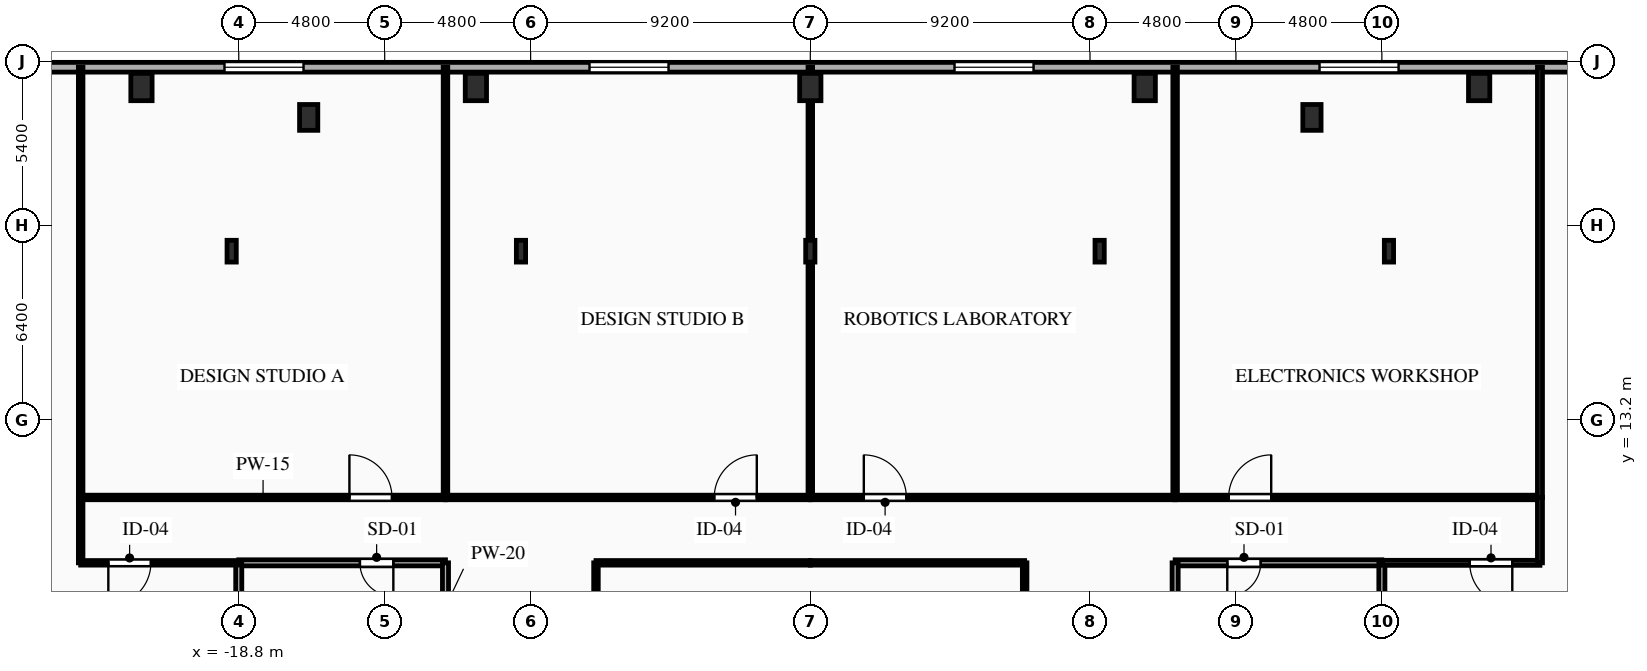
"""IFC4 building model, lengths in metres.
Left out: names, types, materials, properties, quantities, classifications, styles, units other than length and angle.
Written with IfcOpenShell. Run it as: python <this file> out.ifc"""

import sys

from ifc_helpers import new_model, si_unit, direction, frame, frame_2d, origin, origin_2d, place, context, subcontext, project, spatial, rectangle, i_section, extrude, element, fill, save


model = new_model("IFC4")
c1 = context("Model", 3, precision=1e-05, world=origin(), true_north=direction((0.0, 1.0)))
c2 = subcontext(c1, "Body", "Model", "MODEL_VIEW")
j1 = project(units=[si_unit("LENGTHUNIT", "METRE"), si_unit("PLANEANGLEUNIT", "RADIAN")], contexts=[c1])
p1 = place(None, origin())
s1 = spatial("IfcSite", under=j1, at=p1, CompositionType="ELEMENT")
p2 = place(p1, origin())
s2 = spatial("IfcBuilding", under=s1, at=p2, CompositionType="ELEMENT")
p3 = place(p2, frame((0.0, 0.0, 9.0)))
s3 = spatial("IfcBuildingStorey", under=s2, at=p3, CompositionType="ELEMENT", Elevation=9.0)
for number, where, z_axis, x_axis in (
    (1, (-22.0, 24.15, 0.0), (0.0, 0.0, 1.0), (1.0, 0.0, 0.0)),
    (2, (-11.0, 24.15, 0.0), (0.0, 0.0, 1.0), (1.0, 0.0, 0.0)),
    (3, (0.0, 24.15, 0.0), (0.0, 0.0, 1.0), (1.0, 0.0, 0.0)),
    (4, (11.0, 24.15, 0.0), (0.0, 0.0, 1.0), (1.0, 0.0, 0.0)),
    (5, (22.0, 24.15, 0.0), (0.0, 0.0, 1.0), (1.0, 0.0, 0.0)),
):
    element("IfcColumn", number, at=place(p3, frame(where, z_axis=z_axis, x_axis=x_axis)), inside=s3, PredefinedType="COLUMN", context=c2, shape_type="SweptSolid", body=[
        extrude(rectangle(XDim=0.7, YDim=0.9, at=origin_2d()), origin(), (0.0, 0.0, 1.0), 4.5),
    ])
for number, where, z_axis, x_axis in (
    (6, (-16.5, 23.15, 0.0), (0.0, 0.0, 1.0), (1.0, 0.0, 0.0)),
    (7, (16.5, 23.15, 0.0), (0.0, 0.0, 1.0), (1.0, 0.0, 0.0)),
):
    element("IfcColumn", number, at=place(p3, frame(where, z_axis=z_axis, x_axis=x_axis)), inside=s3, PredefinedType="PILASTER", context=c2, shape_type="SweptSolid", body=[
        extrude(rectangle(XDim=0.6, YDim=0.85, at=origin_2d()), origin(), (0.0, 0.0, 1.0), 4.5),
    ])
for number, where, z_axis, x_axis in (
    (8, (19.033, 18.75, 0.0), (0.0, 0.0, 1.0), (1.0, 0.0, 0.0)),
    (9, (9.517, 18.75, 0.0), (0.0, 0.0, 1.0), (1.0, 0.0, 0.0)),
    (10, (0.0, 18.75, 0.0), (0.0, 0.0, 1.0), (1.0, 0.0, 0.0)),
    (11, (-9.517, 18.75, 0.0), (0.0, 0.0, 1.0), (1.0, 0.0, 0.0)),
    (12, (-19.033, 18.75, 0.0), (0.0, 0.0, 1.0), (1.0, 0.0, 0.0)),
):
    element("IfcColumn", number, at=place(p3, frame(where, z_axis=z_axis, x_axis=x_axis)), inside=s3, PredefinedType="COLUMN", context=c2, shape_type="SweptSolid", body=[
        extrude(i_section(OverallWidth=0.304, OverallDepth=0.716, WebThickness=0.021, FlangeThickness=0.04, FilletRadius=0.027, at=origin_2d()), origin(), (0.0, 0.0, 1.0), 4.5),
    ])
p4 = place(p3, frame((-38.3, 24.8, 0.0), z_axis=(0.0, 0.0, 1.0), x_axis=(1.0, 0.0, 0.0)))
e13 = element("IfcWall", 13, at=p4, inside=s3, PredefinedType="SOLIDWALL", context=c2, shape_type="SweptSolid", body=[
    extrude(rectangle(XDim=76.6, YDim=0.32, at=frame_2d((38.3, 0.0))), origin(), (0.0, 0.0, 1.0), 4.17),
])
p5 = place(p4, frame((6.104, 0.0, 0.85)))
e14 = element("IfcOpeningElement", 14, at=p5, cuts=e13, PredefinedType="OPENING", context=c2, shape_type="SweptSolid", body=[
    extrude(rectangle(XDim=2.6, YDim=2.4, at=frame_2d((1.3, 1.2))), frame((0.0, 0.17, 0.0), z_axis=(0.0, -1.0, 0.0), x_axis=(1.0, 0.0, 0.0)), (0.0, 0.0, 1.0), 0.34),
])
p6 = place(p4, frame((19.031, 0.0, 0.85)))
e15 = element("IfcOpeningElement", 15, at=p6, cuts=e13, PredefinedType="OPENING", context=c2, shape_type="SweptSolid", body=[
    extrude(rectangle(XDim=2.6, YDim=2.4, at=frame_2d((1.3, 1.2))), frame((0.0, 0.17, 0.0), z_axis=(0.0, -1.0, 0.0), x_axis=(1.0, 0.0, 0.0)), (0.0, 0.0, 1.0), 0.34),
])
p7 = place(p4, frame((31.037, 0.0, 0.85)))
e16 = element("IfcOpeningElement", 16, at=p7, cuts=e13, PredefinedType="OPENING", context=c2, shape_type="SweptSolid", body=[
    extrude(rectangle(XDim=2.6, YDim=2.4, at=frame_2d((1.3, 1.2))), frame((0.0, 0.17, 0.0), z_axis=(0.0, -1.0, 0.0), x_axis=(1.0, 0.0, 0.0)), (0.0, 0.0, 1.0), 0.34),
])
p8 = place(p4, frame((43.043, 0.0, 0.85)))
e17 = element("IfcOpeningElement", 17, at=p8, cuts=e13, PredefinedType="OPENING", context=c2, shape_type="SweptSolid", body=[
    extrude(rectangle(XDim=2.6, YDim=2.4, at=frame_2d((1.3, 1.2))), frame((0.0, 0.17, 0.0), z_axis=(0.0, -1.0, 0.0), x_axis=(1.0, 0.0, 0.0)), (0.0, 0.0, 1.0), 0.34),
])
p9 = place(p4, frame((55.049, 0.0, 0.85)))
e18 = element("IfcOpeningElement", 18, at=p9, cuts=e13, PredefinedType="OPENING", context=c2, shape_type="SweptSolid", body=[
    extrude(rectangle(XDim=2.6, YDim=2.4, at=frame_2d((1.3, 1.2))), frame((0.0, 0.17, 0.0), z_axis=(0.0, -1.0, 0.0), x_axis=(1.0, 0.0, 0.0)), (0.0, 0.0, 1.0), 0.34),
])
p10 = place(p4, frame((67.976, 0.0, 0.85)))
e19 = element("IfcOpeningElement", 19, at=p10, cuts=e13, PredefinedType="OPENING", context=c2, shape_type="SweptSolid", body=[
    extrude(rectangle(XDim=2.6, YDim=2.4, at=frame_2d((1.3, 1.2))), frame((0.0, 0.17, 0.0), z_axis=(0.0, -1.0, 0.0), x_axis=(1.0, 0.0, 0.0)), (0.0, 0.0, 1.0), 0.34),
])
p11 = place(p3, frame((-12.0, 8.5, 0.0), z_axis=(0.0, 0.0, 1.0), x_axis=(-1.0, 0.0, 0.0)))
e20 = element("IfcWall", 20, at=p11, inside=s3, PredefinedType="PARTITIONING", context=c2, shape_type="SweptSolid", body=[
    extrude(rectangle(XDim=6.8, YDim=0.2, at=frame_2d((3.4, 0.0))), origin(), (0.0, 0.0, 1.0), 4.17),
])
p12 = place(p11, frame((1.715, 0.0, 0.0)))
e21 = element("IfcOpeningElement", 21, at=p12, cuts=e20, PredefinedType="OPENING", context=c2, shape_type="SweptSolid", body=[
    extrude(rectangle(XDim=1.1, YDim=2.15, at=frame_2d((0.55, 1.075))), frame((0.0, 0.11, 0.0), z_axis=(0.0, -1.0, 0.0), x_axis=(1.0, 0.0, 0.0)), (0.0, 0.0, 1.0), 0.22),
])
p13 = place(p3, frame((-12.0, 5.6, 0.0), z_axis=(0.0, 0.0, 1.0), x_axis=(0.0, 1.0, 0.0)))
e22 = element("IfcWall", 22, at=p13, inside=s3, PredefinedType="PARTITIONING", context=c2, shape_type="SweptSolid", body=[
    extrude(rectangle(XDim=2.9, YDim=0.2, at=frame_2d((1.45, 0.0))), origin(), (0.0, 0.0, 1.0), 4.17),
])
p14 = place(p3, frame((-18.8, 8.5, 0.0), z_axis=(0.0, 0.0, 1.0), x_axis=(0.0, -1.0, 0.0)))
e23 = element("IfcWall", 23, at=p14, inside=s3, PredefinedType="PARTITIONING", context=c2, shape_type="SweptSolid", body=[
    extrude(rectangle(XDim=2.9, YDim=0.2, at=frame_2d((1.45, 0.0))), origin(), (0.0, 0.0, 1.0), 3.655),
])
p15 = place(p3, frame((18.8, 8.5, 0.0), z_axis=(0.0, 0.0, 1.0), x_axis=(-1.0, 0.0, 0.0)))
e24 = element("IfcWall", 24, at=p15, inside=s3, PredefinedType="PARTITIONING", context=c2, shape_type="SweptSolid", body=[
    extrude(rectangle(XDim=6.8, YDim=0.2, at=frame_2d((3.4, 0.0))), origin(), (0.0, 0.0, 1.0), 4.17),
])
p16 = place(p15, frame((3.985, 0.0, 0.0)))
e25 = element("IfcOpeningElement", 25, at=p16, cuts=e24, PredefinedType="OPENING", context=c2, shape_type="SweptSolid", body=[
    extrude(rectangle(XDim=1.1, YDim=2.15, at=frame_2d((0.55, 1.075))), frame((0.0, 0.11, 0.0), z_axis=(0.0, -1.0, 0.0), x_axis=(1.0, 0.0, 0.0)), (0.0, 0.0, 1.0), 0.22),
])
p17 = place(p3, frame((12.0, 8.5, 0.0), z_axis=(0.0, 0.0, 1.0), x_axis=(0.0, -1.0, 0.0)))
e26 = element("IfcWall", 26, at=p17, inside=s3, PredefinedType="PARTITIONING", context=c2, shape_type="SweptSolid", body=[
    extrude(rectangle(XDim=2.9, YDim=0.2, at=frame_2d((1.45, 0.0))), origin(), (0.0, 0.0, 1.0), 4.17),
])
p18 = place(p3, frame((18.8, 5.6, 0.0), z_axis=(0.0, 0.0, 1.0), x_axis=(0.0, 1.0, 0.0)))
e27 = element("IfcWall", 27, at=p18, inside=s3, PredefinedType="PARTITIONING", context=c2, shape_type="SweptSolid", body=[
    extrude(rectangle(XDim=2.9, YDim=0.2, at=frame_2d((1.45, 0.0))), origin(), (0.0, 0.0, 1.0), 3.655),
])
p19 = place(p3, frame((-18.8, 8.5, 0.0), z_axis=(0.0, 0.0, 1.0), x_axis=(-1.0, 0.0, 0.0)))
e28 = element("IfcWall", 28, at=p19, inside=s3, PredefinedType="PARTITIONING", context=c2, shape_type="SweptSolid", body=[
    extrude(rectangle(XDim=5.2, YDim=0.15, at=frame_2d((2.6, 0.0))), origin(), (0.0, 0.0, 1.0), 4.17),
])
p20 = place(p19, frame((2.89, 0.0, 0.0)))
e29 = element("IfcOpeningElement", 29, at=p20, cuts=e28, PredefinedType="OPENING", context=c2, shape_type="SweptSolid", body=[
    extrude(rectangle(XDim=1.4, YDim=2.3, at=frame_2d((0.7, 1.15))), frame((0.0, 0.085, 0.0), z_axis=(0.0, -1.0, 0.0), x_axis=(1.0, 0.0, 0.0)), (0.0, 0.0, 1.0), 0.17),
])
p21 = place(p3, frame((-24.0, 8.5, 0.0), z_axis=(0.0, 0.0, 1.0), x_axis=(0.0, 1.0, 0.0)))
e30 = element("IfcWall", 30, at=p21, inside=s3, PredefinedType="PARTITIONING", context=c2, shape_type="SweptSolid", body=[
    extrude(rectangle(XDim=2.15, YDim=0.15, at=frame_2d((1.075, 0.0))), origin(), (0.0, 0.0, 1.0), 4.17),
])
p22 = place(p3, frame((-24.0, 10.65, 0.0), z_axis=(0.0, 0.0, 1.0), x_axis=(1.0, 0.0, 0.0)))
e31 = element("IfcWall", 31, at=p22, inside=s3, PredefinedType="PARTITIONING", context=c2, shape_type="SweptSolid", body=[
    extrude(rectangle(XDim=12.0, YDim=0.15, at=frame_2d((6.0, 0.0))), origin(), (0.0, 0.0, 1.0), 4.17),
])
p23 = place(p22, frame((8.84, 0.0, 0.0)))
e32 = element("IfcOpeningElement", 32, at=p23, cuts=e31, PredefinedType="OPENING", context=c2, shape_type="SweptSolid", body=[
    extrude(rectangle(XDim=1.4, YDim=2.3, at=frame_2d((0.7, 1.15))), frame((0.0, 0.085, 0.0), z_axis=(0.0, -1.0, 0.0), x_axis=(1.0, 0.0, 0.0)), (0.0, 0.0, 1.0), 0.17),
])
p24 = place(p3, frame((-12.0, 10.65, 0.0), z_axis=(0.0, 0.0, 1.0), x_axis=(1.0, 0.0, 0.0)))
e33 = element("IfcWall", 33, at=p24, inside=s3, PredefinedType="PARTITIONING", context=c2, shape_type="SweptSolid", body=[
    extrude(rectangle(XDim=12.0, YDim=0.15, at=frame_2d((6.0, 0.0))), origin(), (0.0, 0.0, 1.0), 4.17),
])
p25 = place(p24, frame((8.84, 0.0, 0.0)))
e34 = element("IfcOpeningElement", 34, at=p25, cuts=e33, PredefinedType="OPENING", context=c2, shape_type="SweptSolid", body=[
    extrude(rectangle(XDim=1.4, YDim=2.3, at=frame_2d((0.7, 1.15))), frame((0.0, 0.085, 0.0), z_axis=(0.0, -1.0, 0.0), x_axis=(1.0, 0.0, 0.0)), (0.0, 0.0, 1.0), 0.17),
])
p26 = place(p3, frame((0.0, 8.5, 0.0), z_axis=(0.0, 0.0, 1.0), x_axis=(-1.0, 0.0, 0.0)))
e35 = element("IfcWall", 35, at=p26, inside=s3, PredefinedType="PARTITIONING", context=c2, shape_type="SweptSolid", body=[
    extrude(rectangle(XDim=7.05, YDim=0.15, at=frame_2d((3.525, 0.0))), origin(), (0.0, 0.0, 1.0), 4.17),
])
p27 = place(p3, frame((0.0, 10.65, 0.0), z_axis=(0.0, 0.0, 1.0), x_axis=(1.0, 0.0, 0.0)))
e36 = element("IfcWall", 36, at=p27, inside=s3, PredefinedType="PARTITIONING", context=c2, shape_type="SweptSolid", body=[
    extrude(rectangle(XDim=12.0, YDim=0.15, at=frame_2d((6.0, 0.0))), origin(), (0.0, 0.0, 1.0), 4.17),
])
p28 = place(p27, frame((1.76, 0.0, 0.0)))
e37 = element("IfcOpeningElement", 37, at=p28, cuts=e36, PredefinedType="OPENING", context=c2, shape_type="SweptSolid", body=[
    extrude(rectangle(XDim=1.4, YDim=2.3, at=frame_2d((0.7, 1.15))), frame((0.0, 0.085, 0.0), z_axis=(0.0, -1.0, 0.0), x_axis=(1.0, 0.0, 0.0)), (0.0, 0.0, 1.0), 0.17),
])
p29 = place(p3, frame((12.0, 10.65, 0.0), z_axis=(0.0, 0.0, 1.0), x_axis=(1.0, 0.0, 0.0)))
e38 = element("IfcWall", 38, at=p29, inside=s3, PredefinedType="PARTITIONING", context=c2, shape_type="SweptSolid", body=[
    extrude(rectangle(XDim=12.0, YDim=0.15, at=frame_2d((6.0, 0.0))), origin(), (0.0, 0.0, 1.0), 4.17),
])
p30 = place(p29, frame((1.76, 0.0, 0.0)))
e39 = element("IfcOpeningElement", 39, at=p30, cuts=e38, PredefinedType="OPENING", context=c2, shape_type="SweptSolid", body=[
    extrude(rectangle(XDim=1.4, YDim=2.3, at=frame_2d((0.7, 1.15))), frame((0.0, 0.085, 0.0), z_axis=(0.0, -1.0, 0.0), x_axis=(1.0, 0.0, 0.0)), (0.0, 0.0, 1.0), 0.17),
])
p31 = place(p3, frame((7.05, 8.5, 0.0), z_axis=(0.0, 0.0, 1.0), x_axis=(-1.0, 0.0, 0.0)))
e40 = element("IfcWall", 40, at=p31, inside=s3, PredefinedType="PARTITIONING", context=c2, shape_type="SweptSolid", body=[
    extrude(rectangle(XDim=7.05, YDim=0.15, at=frame_2d((3.525, 0.0))), origin(), (0.0, 0.0, 1.0), 4.17),
])
p32 = place(p3, frame((24.0, 8.5, 0.0), z_axis=(0.0, 0.0, 1.0), x_axis=(-1.0, 0.0, 0.0)))
e41 = element("IfcWall", 41, at=p32, inside=s3, PredefinedType="PARTITIONING", context=c2, shape_type="SweptSolid", body=[
    extrude(rectangle(XDim=5.2, YDim=0.165, at=frame_2d((2.6, 0.0))), origin(), (0.0, 0.0, 1.0), 4.17),
])
p33 = place(p32, frame((0.91, 0.0, 0.0)))
e42 = element("IfcOpeningElement", 42, at=p33, cuts=e41, PredefinedType="OPENING", context=c2, shape_type="SweptSolid", body=[
    extrude(rectangle(XDim=1.4, YDim=2.3, at=frame_2d((0.7, 1.15))), frame((0.0, 0.093, 0.0), z_axis=(0.0, -1.0, 0.0), x_axis=(1.0, 0.0, 0.0)), (0.0, 0.0, 1.0), 0.185),
])
p34 = place(p3, frame((24.0, 10.65, 0.0), z_axis=(0.0, 0.0, 1.0), x_axis=(0.0, -1.0, 0.0)))
e43 = element("IfcWall", 43, at=p34, inside=s3, PredefinedType="PARTITIONING", context=c2, shape_type="SweptSolid", body=[
    extrude(rectangle(XDim=2.15, YDim=0.165, at=frame_2d((1.075, 0.0))), origin(), (0.0, 0.0, 1.0), 4.17),
])
p35 = place(p3, frame((-7.05, 8.5, 0.0), z_axis=(0.0, 0.0, 1.0), x_axis=(0.0, -1.0, 0.0)))
e44 = element("IfcWall", 44, at=p35, inside=s3, PredefinedType="PARTITIONING", context=c2, shape_type="SweptSolid", body=[
    extrude(rectangle(XDim=14.1, YDim=0.15, at=frame_2d((7.05, 0.0))), origin(), (0.0, 0.0, 1.0), 4.17),
])
p36 = place(p35, frame((8.074, 0.0, 0.0)))
e45 = element("IfcOpeningElement", 45, at=p36, cuts=e44, PredefinedType="OPENING", context=c2, shape_type="SweptSolid", body=[
    extrude(rectangle(XDim=0.95, YDim=2.1, at=frame_2d((0.475, 1.05))), frame((0.0, 0.085, 0.0), z_axis=(0.0, -1.0, 0.0), x_axis=(1.0, 0.0, 0.0)), (0.0, 0.0, 1.0), 0.17),
])
p37 = place(p3, frame((7.05, -5.6, 0.0), z_axis=(0.0, 0.0, 1.0), x_axis=(0.0, 1.0, 0.0)))
e46 = element("IfcWall", 46, at=p37, inside=s3, PredefinedType="PARTITIONING", context=c2, shape_type="SweptSolid", body=[
    extrude(rectangle(XDim=14.1, YDim=0.15, at=frame_2d((7.05, 0.0))), origin(), (0.0, 0.0, 1.0), 4.17),
])
for number, where, z_axis, x_axis in (
    (47, (-24.0, 24.8, 0.0), (0.0, 0.0, 1.0), (0.0, -1.0, 0.0)),
    (48, (-12.0, 24.8, 0.0), (0.0, 0.0, 1.0), (0.0, -1.0, 0.0)),
):
    element("IfcWall", number, at=place(p3, frame(where, z_axis=z_axis, x_axis=x_axis)), inside=s3, PredefinedType="PARTITIONING", context=c2, shape_type="SweptSolid", body=[
        extrude(rectangle(XDim=14.15, YDim=0.15, at=frame_2d((7.075, 0.0))), origin(), (0.0, 0.0, 1.0), 4.17),
    ])
p38 = place(p3, frame((0.0, 24.8, 0.0), z_axis=(0.0, 0.0, 1.0), x_axis=(0.0, -1.0, 0.0)))
e49 = element("IfcWall", 49, at=p38, inside=s3, PredefinedType="PARTITIONING", context=c2, shape_type="SweptSolid", body=[
    extrude(rectangle(XDim=14.15, YDim=0.15, at=frame_2d((7.075, 0.0))), origin(), (0.0, 0.0, 1.0), 3.555),
])
p39 = place(p3, frame((12.0, 24.8, 0.0), z_axis=(0.0, 0.0, 1.0), x_axis=(0.0, -1.0, 0.0)))
e50 = element("IfcWall", 50, at=p39, inside=s3, PredefinedType="PARTITIONING", context=c2, shape_type="SweptSolid", body=[
    extrude(rectangle(XDim=14.15, YDim=0.15, at=frame_2d((7.075, 0.0))), origin(), (0.0, 0.0, 1.0), 4.17),
])
p40 = place(p3, frame((24.0, 24.8, 0.0), z_axis=(0.0, 0.0, 1.0), x_axis=(0.0, -1.0, 0.0)))
e51 = element("IfcWall", 51, at=p40, inside=s3, PredefinedType="PARTITIONING", context=c2, shape_type="SweptSolid", body=[
    extrude(rectangle(XDim=14.15, YDim=0.165, at=frame_2d((7.075, 0.0))), origin(), (0.0, 0.0, 1.0), 4.17),
])
p41 = place(p6, origin())
e52 = element("IfcWindow", 52, at=p41, inside=s3, PartitioningType="SINGLE_PANEL", PredefinedType="WINDOW", context=c2, shape_type="SweptSolid", body=[
    extrude(rectangle(XDim=2.6, YDim=2.4, at=frame_2d((1.3, 1.2))), frame((0.0, 0.03, 0.0), z_axis=(0.0, -1.0, 0.0), x_axis=(1.0, 0.0, 0.0)), (0.0, 0.0, 1.0), 0.06),
])
fill(e15, e52)
p42 = place(p7, origin())
e53 = element("IfcWindow", 53, at=p42, inside=s3, PartitioningType="SINGLE_PANEL", PredefinedType="WINDOW", context=c2, shape_type="SweptSolid", body=[
    extrude(rectangle(XDim=2.6, YDim=2.4, at=frame_2d((1.3, 1.2))), frame((0.0, 0.03, 0.0), z_axis=(0.0, -1.0, 0.0), x_axis=(1.0, 0.0, 0.0)), (0.0, 0.0, 1.0), 0.06),
])
fill(e16, e53)
p43 = place(p8, origin())
e54 = element("IfcWindow", 54, at=p43, inside=s3, PartitioningType="SINGLE_PANEL", PredefinedType="WINDOW", context=c2, shape_type="SweptSolid", body=[
    extrude(rectangle(XDim=2.6, YDim=2.4, at=frame_2d((1.3, 1.2))), frame((0.0, 0.03, 0.0), z_axis=(0.0, -1.0, 0.0), x_axis=(1.0, 0.0, 0.0)), (0.0, 0.0, 1.0), 0.06),
])
fill(e17, e54)
p44 = place(p9, origin())
e55 = element("IfcWindow", 55, at=p44, inside=s3, PartitioningType="SINGLE_PANEL", PredefinedType="WINDOW", context=c2, shape_type="SweptSolid", body=[
    extrude(rectangle(XDim=2.6, YDim=2.4, at=frame_2d((1.3, 1.2))), frame((0.0, 0.03, 0.0), z_axis=(0.0, -1.0, 0.0), x_axis=(1.0, 0.0, 0.0)), (0.0, 0.0, 1.0), 0.06),
])
fill(e18, e55)
p45 = place(p12, origin())
e56 = element("IfcDoor", 56, at=p45, inside=s3, OperationType="SINGLE_SWING_LEFT", PredefinedType="DOOR", context=c2, shape_type="SweptSolid", body=[
    extrude(rectangle(XDim=1.1, YDim=2.15, at=frame_2d((0.55, 1.075))), frame((0.0, 0.025, 0.0), z_axis=(0.0, -1.0, 0.0), x_axis=(1.0, 0.0, 0.0)), (0.0, 0.0, 1.0), 0.05),
])
fill(e21, e56)
p46 = place(p16, origin())
e57 = element("IfcDoor", 57, at=p46, inside=s3, OperationType="SINGLE_SWING_RIGHT", PredefinedType="DOOR", context=c2, shape_type="SweptSolid", body=[
    extrude(rectangle(XDim=1.1, YDim=2.15, at=frame_2d((0.55, 1.075))), frame((0.0, 0.025, 0.0), z_axis=(0.0, -1.0, 0.0), x_axis=(1.0, 0.0, 0.0)), (0.0, 0.0, 1.0), 0.05),
])
fill(e25, e57)
p47 = place(p20, origin())
e58 = element("IfcDoor", 58, at=p47, inside=s3, OperationType="SINGLE_SWING_RIGHT", PredefinedType="DOOR", context=c2, shape_type="SweptSolid", body=[
    extrude(rectangle(XDim=1.4, YDim=2.3, at=frame_2d((0.7, 1.15))), frame((0.0, 0.025, 0.0), z_axis=(0.0, -1.0, 0.0), x_axis=(1.0, 0.0, 0.0)), (0.0, 0.0, 1.0), 0.05),
])
fill(e29, e58)
p48 = place(p23, origin())
e59 = element("IfcDoor", 59, at=p48, inside=s3, OperationType="SINGLE_SWING_LEFT", PredefinedType="DOOR", context=c2, shape_type="SweptSolid", body=[
    extrude(rectangle(XDim=1.4, YDim=2.3, at=frame_2d((0.7, 1.15))), frame((0.0, 0.025, 0.0), z_axis=(0.0, -1.0, 0.0), x_axis=(1.0, 0.0, 0.0)), (0.0, 0.0, 1.0), 0.05),
])
fill(e32, e59)
p49 = place(p25, origin())
e60 = element("IfcDoor", 60, at=p49, inside=s3, OperationType="SINGLE_SWING_RIGHT", PredefinedType="DOOR", context=c2, shape_type="SweptSolid", body=[
    extrude(rectangle(XDim=1.4, YDim=2.3, at=frame_2d((0.7, 1.15))), frame((0.0, 0.025, 0.0), z_axis=(0.0, -1.0, 0.0), x_axis=(1.0, 0.0, 0.0)), (0.0, 0.0, 1.0), 0.05),
])
fill(e34, e60)
p50 = place(p28, origin())
e61 = element("IfcDoor", 61, at=p50, inside=s3, OperationType="SINGLE_SWING_LEFT", PredefinedType="DOOR", context=c2, shape_type="SweptSolid", body=[
    extrude(rectangle(XDim=1.4, YDim=2.3, at=frame_2d((0.7, 1.15))), frame((0.0, 0.025, 0.0), z_axis=(0.0, -1.0, 0.0), x_axis=(1.0, 0.0, 0.0)), (0.0, 0.0, 1.0), 0.05),
])
fill(e37, e61)
p51 = place(p30, origin())
e62 = element("IfcDoor", 62, at=p51, inside=s3, OperationType="SINGLE_SWING_RIGHT", PredefinedType="DOOR", context=c2, shape_type="SweptSolid", body=[
    extrude(rectangle(XDim=1.4, YDim=2.3, at=frame_2d((0.7, 1.15))), frame((0.0, 0.025, 0.0), z_axis=(0.0, -1.0, 0.0), x_axis=(1.0, 0.0, 0.0)), (0.0, 0.0, 1.0), 0.05),
])
fill(e39, e62)
p52 = place(p33, origin())
e63 = element("IfcDoor", 63, at=p52, inside=s3, OperationType="SINGLE_SWING_LEFT", PredefinedType="DOOR", context=c2, shape_type="SweptSolid", body=[
    extrude(rectangle(XDim=1.4, YDim=2.3, at=frame_2d((0.7, 1.15))), frame((0.0, 0.025, 0.0), z_axis=(0.0, -1.0, 0.0), x_axis=(1.0, 0.0, 0.0)), (0.0, 0.0, 1.0), 0.05),
])
fill(e42, e63)
save(model, sys.argv[1])
